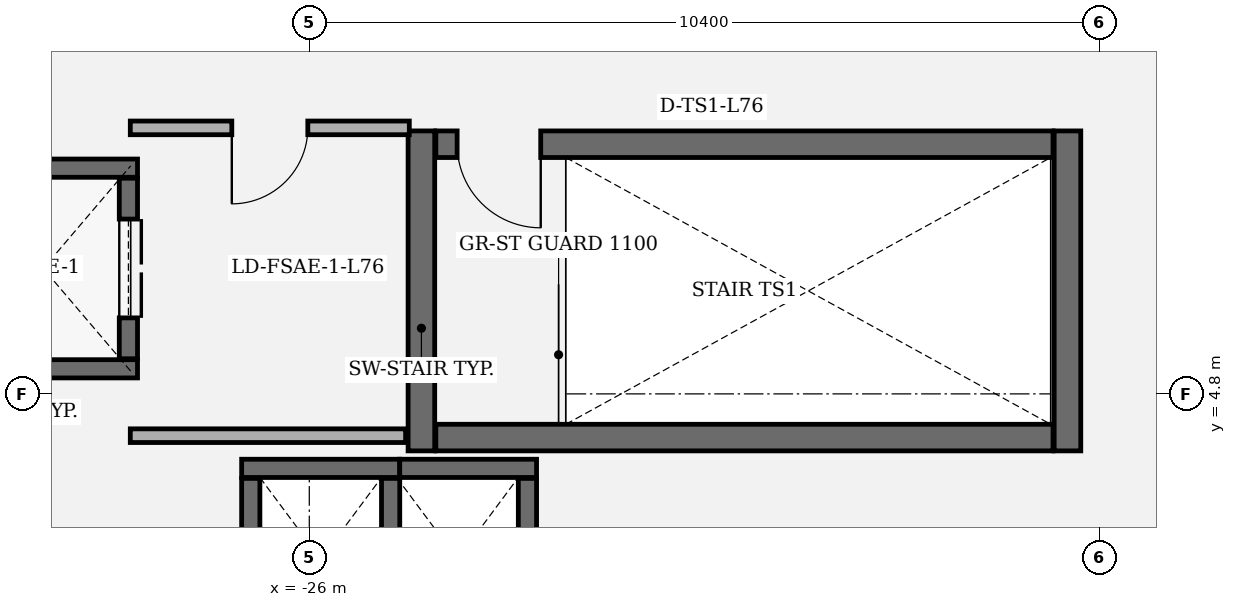
"""IFC4 building model, lengths in metres.
Left out: names, types, materials, properties, quantities, classifications, styles, units other than length and angle.
Written with IfcOpenShell. Run it as: python <this file> out.ifc"""

import sys

from ifc_helpers import new_model, si_unit, direction, frame, frame_2d, origin, place, context, subcontext, project, spatial, rectangle, extrude, element, fill, save


model = new_model("IFC4")
c1 = context("Model", 3, precision=1e-05, world=origin(), true_north=direction((0.0, 1.0)))
c2 = subcontext(c1, "Body", "Model", "MODEL_VIEW")
j1 = project(units=[si_unit("LENGTHUNIT", "METRE"), si_unit("PLANEANGLEUNIT", "RADIAN")], contexts=[c1])
p1 = place(None, origin())
s1 = spatial("IfcSite", under=j1, at=p1, CompositionType="ELEMENT")
p2 = place(p1, origin())
s2 = spatial("IfcBuilding", under=s1, at=p2, CompositionType="ELEMENT")
p3 = place(p2, frame((0.0, 0.0, 327.0)))
s3 = spatial("IfcBuildingStorey", under=s2, at=p3, CompositionType="ELEMENT", Elevation=327.0)
for number, where, z_axis, x_axis in (
    (1, (-24.525, 8.26, 0.0), (0.0, 0.0, 1.0), (0.0, -1.0, 0.0)),
    (2, (-16.025, 4.05, 0.0), (0.0, 0.0, 1.0), (0.0, 1.0, 0.0)),
):
    element("IfcWall", number, at=place(p3, frame(where, z_axis=z_axis, x_axis=x_axis)), inside=s3, PredefinedType="SHEAR", context=c2, shape_type="SweptSolid", body=[
        extrude(rectangle(XDim=4.21, YDim=0.35, at=frame_2d((2.105, 0.0))), origin(), (0.0, 0.0, 1.0), 3.92),
    ])
p4 = place(p3, frame((-24.335, 4.225, 0.0), z_axis=(0.0, 0.0, 1.0), x_axis=(1.0, 0.0, 0.0)))
e3 = element("IfcWall", 3, at=p4, inside=s3, PredefinedType="SHEAR", context=c2, shape_type="SweptSolid", body=[
    extrude(rectangle(XDim=8.12, YDim=0.35, at=frame_2d((4.06, 0.0))), origin(), (0.0, 0.0, 1.0), 3.92),
])
p5 = place(p3, frame((-16.215, 8.085, 0.0), z_axis=(0.0, 0.0, 1.0), x_axis=(-1.0, 0.0, 0.0)))
e4 = element("IfcWall", 4, at=p5, inside=s3, PredefinedType="SHEAR", context=c2, shape_type="SweptSolid", body=[
    extrude(rectangle(XDim=8.12, YDim=0.35, at=frame_2d((4.06, 0.0))), origin(), (0.0, 0.0, 1.0), 3.92),
])
p6 = place(p5, frame((6.74, 0.0, 0.0)))
e5 = element("IfcOpeningElement", 5, at=p6, cuts=e4, PredefinedType="OPENING", context=c2, shape_type="SweptSolid", body=[
    extrude(rectangle(XDim=1.1, YDim=2.2, at=frame_2d((0.55, 1.1))), frame((0.0, 0.185, 0.0), z_axis=(0.0, -1.0, 0.0), x_axis=(1.0, 0.0, 0.0)), (0.0, 0.0, 1.0), 0.37),
])
for number, where, z_axis, x_axis in (
    (6, (-28.26, 5.13, 0.0), (0.0, 0.0, 1.0), (-1.0, 0.0, 0.0)),
    (7, (-30.74, 7.77, 0.0), (0.0, 0.0, 1.0), (1.0, 0.0, 0.0)),
):
    element("IfcWall", number, at=place(p3, frame(where, z_axis=z_axis, x_axis=x_axis)), inside=s3, PredefinedType="SHEAR", context=c2, shape_type="SweptSolid", body=[
        extrude(rectangle(XDim=2.48, YDim=0.24, at=frame_2d((1.24, 0.0))), origin(), (0.0, 0.0, 1.0), 3.92),
    ])
p7 = place(p3, frame((-28.38, 7.638, 0.0), z_axis=(0.0, 0.0, 1.0), x_axis=(0.0, -1.0, 0.0)))
e8 = element("IfcWall", 8, at=p7, inside=s3, PredefinedType="SHEAR", context=c2, shape_type="SweptSolid", body=[
    extrude(rectangle(XDim=2.376, YDim=0.24, at=frame_2d((1.188, 0.0))), origin(), (0.0, 0.0, 1.0), 3.92),
])
p8 = place(p7, frame((0.538, 0.0, 0.0)))
e9 = element("IfcOpeningElement", 9, at=p8, cuts=e8, PredefinedType="OPENING", context=c2, shape_type="SweptSolid", body=[
    extrude(rectangle(XDim=1.3, YDim=2.3, at=frame_2d((0.65, 1.15))), frame((0.0, 0.13, 0.0), z_axis=(0.0, -1.0, 0.0), x_axis=(1.0, 0.0, 0.0)), (0.0, 0.0, 1.0), 0.26),
])
p9 = place(p3, frame((-26.89, 3.82, 0.0), z_axis=(0.0, 0.0, 1.0), x_axis=(1.0, 0.0, 0.0)))
e10 = element("IfcWall", 10, at=p9, inside=s3, PredefinedType="SHEAR", context=c2, shape_type="SweptSolid", body=[
    extrude(rectangle(XDim=2.08, YDim=0.24, at=frame_2d((1.04, 0.0))), origin(), (0.0, 0.0, 1.0), 3.92),
])
for number, where, z_axis, x_axis in (
    (11, (-26.77, 1.562, 0.0), (0.0, 0.0, 1.0), (0.0, 1.0, 0.0)),
    (12, (-24.93, 3.688, 0.0), (0.0, 0.0, 1.0), (0.0, -1.0, 0.0)),
):
    element("IfcWall", number, at=place(p3, frame(where, z_axis=z_axis, x_axis=x_axis)), inside=s3, PredefinedType="SHEAR", context=c2, shape_type="SweptSolid", body=[
        extrude(rectangle(XDim=2.126, YDim=0.24, at=frame_2d((1.063, 0.0))), origin(), (0.0, 0.0, 1.0), 3.92),
    ])
p10 = place(p3, frame((-24.81, 3.82, 0.0), z_axis=(0.0, 0.0, 1.0), x_axis=(1.0, 0.0, 0.0)))
e13 = element("IfcWall", 13, at=p10, inside=s3, PredefinedType="SHEAR", context=c2, shape_type="SweptSolid", body=[
    extrude(rectangle(XDim=1.8, YDim=0.24, at=frame_2d((0.9, 0.0))), origin(), (0.0, 0.0, 1.0), 3.92),
])
p11 = place(p3, frame((-23.13, 3.688, 0.0), z_axis=(0.0, 0.0, 1.0), x_axis=(0.0, -1.0, 0.0)))
e14 = element("IfcWall", 14, at=p11, inside=s3, PredefinedType="SHEAR", context=c2, shape_type="SweptSolid", body=[
    extrude(rectangle(XDim=2.126, YDim=0.24, at=frame_2d((1.063, 0.0))), origin(), (0.0, 0.0, 1.0), 3.92),
])
p12 = place(p3, frame((-28.355, 4.25, 0.0), z_axis=(0.0, 0.0, 1.0), x_axis=(1.0, 0.0, 0.0)))
e15 = element("IfcWall", 15, at=p12, inside=s3, PredefinedType="PARTITIONING", context=c2, shape_type="SweptSolid", body=[
    extrude(rectangle(XDim=3.622, YDim=0.18, at=frame_2d((1.811, 0.0))), origin(), (0.0, 0.0, 1.0), 3.92),
])
p13 = place(p3, frame((-24.684, 8.3, 0.0), z_axis=(0.0, 0.0, 1.0), x_axis=(-1.0, 0.0, 0.0)))
e16 = element("IfcWall", 16, at=p13, inside=s3, PredefinedType="PARTITIONING", context=c2, shape_type="SweptSolid", body=[
    extrude(rectangle(XDim=3.671, YDim=0.18, at=frame_2d((1.835, 0.0))), origin(), (0.0, 0.0, 1.0), 3.92),
])
p14 = place(p13, frame((1.335, 0.0, 0.0)))
e17 = element("IfcOpeningElement", 17, at=p14, cuts=e16, PredefinedType="OPENING", context=c2, shape_type="SweptSolid", body=[
    extrude(rectangle(XDim=1.0, YDim=2.15, at=frame_2d((0.5, 1.075))), frame((0.0, 0.1, 0.0), z_axis=(0.0, -1.0, 0.0), x_axis=(1.0, 0.0, 0.0)), (0.0, 0.0, 1.0), 0.2),
])
p15 = place(p6, origin())
e18 = element("IfcDoor", 18, at=p15, inside=s3, OperationType="SINGLE_SWING_LEFT", PredefinedType="DOOR", context=c2, shape_type="SweptSolid", body=[
    extrude(rectangle(XDim=1.1, YDim=2.2, at=frame_2d((0.55, 1.1))), frame((0.0, 0.025, 0.0), z_axis=(0.0, -1.0, 0.0), x_axis=(1.0, 0.0, 0.0)), (0.0, 0.0, 1.0), 0.05),
])
fill(e5, e18)
p16 = place(p8, origin())
e19 = element("IfcDoor", 19, at=p16, inside=s3, OperationType="DOUBLE_DOOR_SLIDING", PredefinedType="DOOR", context=c2, shape_type="SweptSolid", body=[
    extrude(rectangle(XDim=1.3, YDim=2.3, at=frame_2d((0.65, 1.15))), frame((0.0, 0.025, 0.0), z_axis=(0.0, -1.0, 0.0), x_axis=(1.0, 0.0, 0.0)), (0.0, 0.0, 1.0), 0.05),
])
fill(e9, e19)
p17 = place(p14, origin())
e20 = element("IfcDoor", 20, at=p17, inside=s3, OperationType="SINGLE_SWING_RIGHT", PredefinedType="DOOR", context=c2, shape_type="SweptSolid", body=[
    extrude(rectangle(XDim=1.0, YDim=2.15, at=frame_2d((0.5, 1.075))), frame((0.0, 0.025, 0.0), z_axis=(0.0, -1.0, 0.0), x_axis=(1.0, 0.0, 0.0)), (0.0, 0.0, 1.0), 0.05),
])
fill(e17, e20)
save(model, sys.argv[1])
